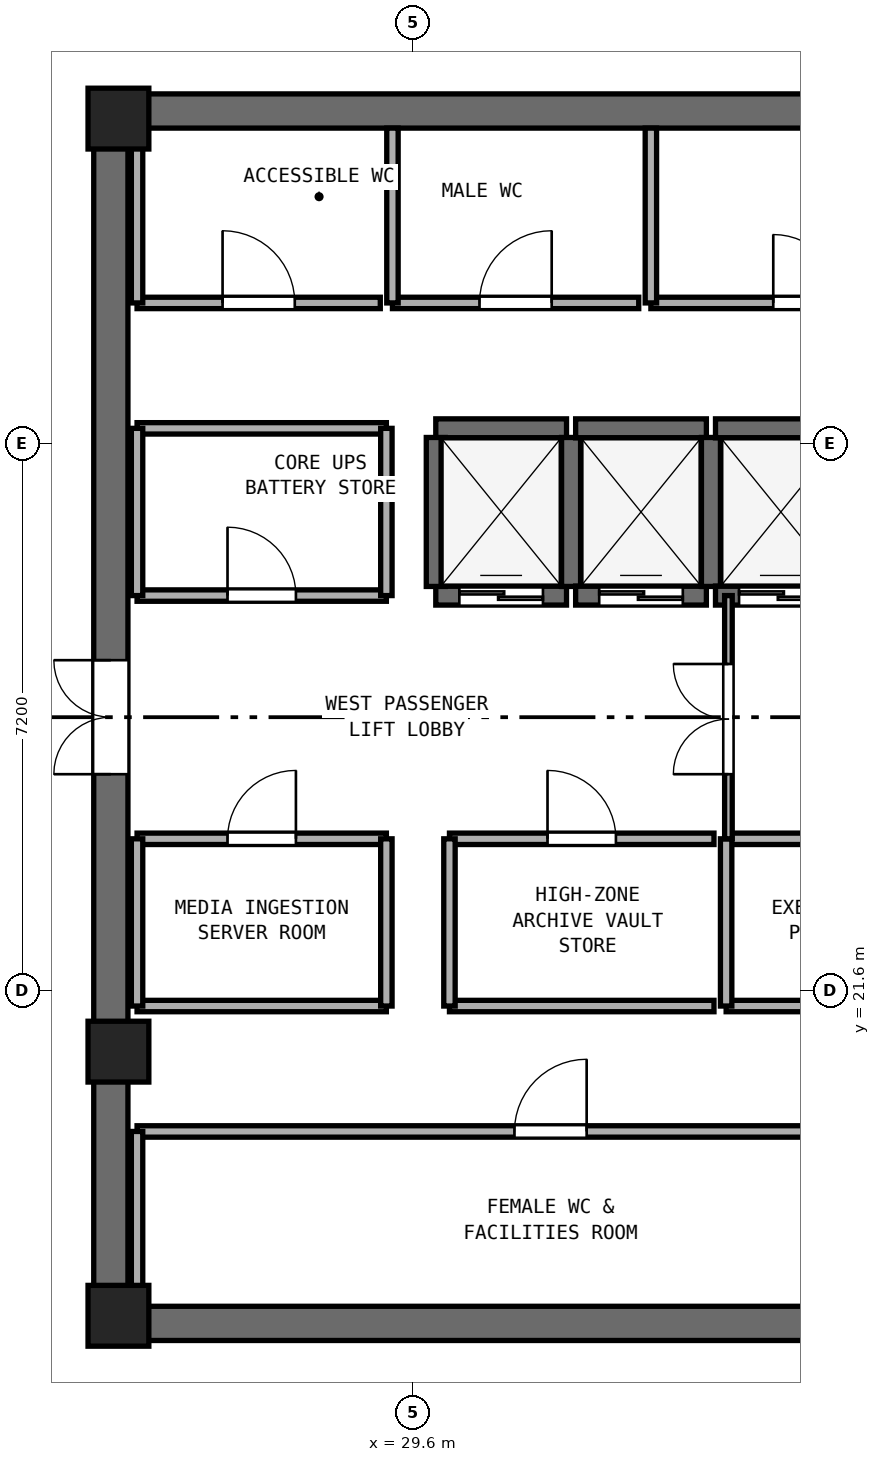
"""IFC4 building model, lengths in metres.
Left out: names, types, materials, properties, quantities, classifications, styles, units other than length and angle.
Written with IfcOpenShell. Run it as: python <this file> out.ifc"""

import sys

from ifc_helpers import new_model, si_unit, direction, frame, frame_2d, origin, origin_2d, place, context, subcontext, project, spatial, rectangle, extrude, element, fill, save


model = new_model("IFC4")
c1 = context("Model", 3, precision=1e-05, world=origin(), true_north=direction((0.0, 1.0)))
c2 = subcontext(c1, "Body", "Model", "MODEL_VIEW")
j1 = project(units=[si_unit("LENGTHUNIT", "METRE"), si_unit("PLANEANGLEUNIT", "RADIAN")], contexts=[c1])
p1 = place(None, origin())
s1 = spatial("IfcSite", under=j1, at=p1, CompositionType="ELEMENT")
p2 = place(p1, origin())
s2 = spatial("IfcBuilding", under=s1, at=p2, CompositionType="ELEMENT")
p3 = place(p2, frame((0.0, 0.0, 232.6)))
s3 = spatial("IfcBuildingStorey", under=s2, at=p3, CompositionType="ELEMENT", Elevation=232.6)
for number, where, z_axis, x_axis in (
    (1, (25.4, 17.225, 0.0), (0.0, 0.0, 1.0), (1.0, 0.0, 0.0)),
    (2, (25.4, 33.175, 0.0), (0.0, 0.0, 1.0), (1.0, 0.0, 0.0)),
):
    element("IfcWall", number, at=place(p3, frame(where, z_axis=z_axis, x_axis=x_axis)), inside=s3, PredefinedType="SHEAR", context=c2, shape_type="SweptSolid", body=[
        extrude(rectangle(XDim=23.2, YDim=0.45, at=frame_2d((11.6, 0.0))), origin(), (0.0, 0.0, 1.0), 3.51),
    ])
p4 = place(p3, frame((25.625, 17.45, 0.0), z_axis=(0.0, 0.0, 1.0), x_axis=(0.0, 1.0, 0.0)))
e3 = element("IfcWall", 3, at=p4, inside=s3, PredefinedType="SHEAR", context=c2, shape_type="SweptSolid", body=[
    extrude(rectangle(XDim=15.5, YDim=0.45, at=frame_2d((7.75, 0.0))), origin(), (0.0, 0.0, 1.0), 3.51),
])
p5 = place(p4, frame((7.0, 0.0, 0.0)))
e4 = element("IfcOpeningElement", 4, at=p5, cuts=e3, PredefinedType="OPENING", context=c2, shape_type="SweptSolid", body=[
    extrude(rectangle(XDim=1.5, YDim=2.15, at=frame_2d((0.75, 1.075))), frame((0.0, 0.235, 0.0), z_axis=(0.0, -1.0, 0.0), x_axis=(1.0, 0.0, 0.0)), (0.0, 0.0, 1.0), 0.47),
])
for number, where, z_axis, x_axis in (
    (5, (25.725, 17.325, 0.0), (0.0, 0.0, 1.0), (1.0, 0.0, 0.0)),
    (6, (25.725, 33.075, 0.0), (0.0, 0.0, 1.0), (1.0, 0.0, 0.0)),
    (7, (25.725, 20.8, 0.0), (0.0, 0.0, 1.0), (1.0, 0.0, 0.0)),
):
    element("IfcColumn", number, at=place(p3, frame(where, z_axis=z_axis, x_axis=x_axis)), inside=s3, PredefinedType="PILASTER", context=c2, shape_type="SweptSolid", body=[
        extrude(rectangle(XDim=0.8, YDim=0.8, at=origin_2d()), origin(), (0.0, 0.0, 1.0), 3.8),
    ])
p6 = place(p3, frame((29.9, 26.8, 0.0), z_axis=(0.0, 0.0, 1.0), x_axis=(1.0, 0.0, 0.0)))
e8 = element("IfcWall", 8, at=p6, inside=s3, PredefinedType="SHEAR", context=c2, shape_type="SweptSolid", body=[
    extrude(rectangle(XDim=1.72, YDim=0.25, at=frame_2d((0.86, 0.0))), origin(), (0.0, 0.0, 1.0), 3.51),
])
p7 = place(p6, frame((0.31, 0.0, 0.0)))
e9 = element("IfcOpeningElement", 9, at=p7, cuts=e8, PredefinedType="OPENING", context=c2, shape_type="SweptSolid", body=[
    extrude(rectangle(XDim=1.1, YDim=2.15, at=frame_2d((0.55, 1.075))), frame((0.0, 0.135, 0.0), z_axis=(0.0, -1.0, 0.0), x_axis=(1.0, 0.0, 0.0)), (0.0, 0.0, 1.0), 0.27),
])
p8 = place(p3, frame((29.9, 29.0, 0.0), z_axis=(0.0, 0.0, 1.0), x_axis=(1.0, 0.0, 0.0)))
e10 = element("IfcWall", 10, at=p8, inside=s3, PredefinedType="SHEAR", context=c2, shape_type="SweptSolid", body=[
    extrude(rectangle(XDim=1.72, YDim=0.25, at=frame_2d((0.86, 0.0))), origin(), (0.0, 0.0, 1.0), 3.51),
])
for number, where, z_axis, x_axis in (
    (11, (29.9, 26.92, 0.0), (0.0, 0.0, 1.0), (0.0, 1.0, 0.0)),
    (12, (31.68, 26.92, 0.0), (0.0, 0.0, 1.0), (0.0, 1.0, 0.0)),
):
    element("IfcWall", number, at=place(p3, frame(where, z_axis=z_axis, x_axis=x_axis)), inside=s3, PredefinedType="SHEAR", context=c2, shape_type="SweptSolid", body=[
        extrude(rectangle(XDim=1.96, YDim=0.25, at=frame_2d((0.98, 0.0))), origin(), (0.0, 0.0, 1.0), 3.51),
    ])
p9 = place(p3, frame((31.74, 26.8, 0.0), z_axis=(0.0, 0.0, 1.0), x_axis=(1.0, 0.0, 0.0)))
e13 = element("IfcWall", 13, at=p9, inside=s3, PredefinedType="SHEAR", context=c2, shape_type="SweptSolid", body=[
    extrude(rectangle(XDim=1.72, YDim=0.25, at=frame_2d((0.86, 0.0))), origin(), (0.0, 0.0, 1.0), 3.51),
])
p10 = place(p9, frame((0.31, 0.0, 0.0)))
e14 = element("IfcOpeningElement", 14, at=p10, cuts=e13, PredefinedType="OPENING", context=c2, shape_type="SweptSolid", body=[
    extrude(rectangle(XDim=1.1, YDim=2.15, at=frame_2d((0.55, 1.075))), frame((0.0, 0.135, 0.0), z_axis=(0.0, -1.0, 0.0), x_axis=(1.0, 0.0, 0.0)), (0.0, 0.0, 1.0), 0.27),
])
p11 = place(p3, frame((31.74, 29.0, 0.0), z_axis=(0.0, 0.0, 1.0), x_axis=(1.0, 0.0, 0.0)))
e15 = element("IfcWall", 15, at=p11, inside=s3, PredefinedType="SHEAR", context=c2, shape_type="SweptSolid", body=[
    extrude(rectangle(XDim=1.72, YDim=0.25, at=frame_2d((0.86, 0.0))), origin(), (0.0, 0.0, 1.0), 3.51),
])
p12 = place(p3, frame((33.52, 26.92, 0.0), z_axis=(0.0, 0.0, 1.0), x_axis=(0.0, 1.0, 0.0)))
e16 = element("IfcWall", 16, at=p12, inside=s3, PredefinedType="SHEAR", context=c2, shape_type="SweptSolid", body=[
    extrude(rectangle(XDim=1.96, YDim=0.25, at=frame_2d((0.98, 0.0))), origin(), (0.0, 0.0, 1.0), 3.51),
])
p13 = place(p3, frame((33.58, 26.8, 0.0), z_axis=(0.0, 0.0, 1.0), x_axis=(1.0, 0.0, 0.0)))
e17 = element("IfcWall", 17, at=p13, inside=s3, PredefinedType="SHEAR", context=c2, shape_type="SweptSolid", body=[
    extrude(rectangle(XDim=1.72, YDim=0.25, at=frame_2d((0.86, 0.0))), origin(), (0.0, 0.0, 1.0), 3.51),
])
p14 = place(p13, frame((0.31, 0.0, 0.0)))
e18 = element("IfcOpeningElement", 18, at=p14, cuts=e17, PredefinedType="OPENING", context=c2, shape_type="SweptSolid", body=[
    extrude(rectangle(XDim=1.1, YDim=2.15, at=frame_2d((0.55, 1.075))), frame((0.0, 0.135, 0.0), z_axis=(0.0, -1.0, 0.0), x_axis=(1.0, 0.0, 0.0)), (0.0, 0.0, 1.0), 0.27),
])
p15 = place(p3, frame((33.58, 29.0, 0.0), z_axis=(0.0, 0.0, 1.0), x_axis=(1.0, 0.0, 0.0)))
e19 = element("IfcWall", 19, at=p15, inside=s3, PredefinedType="SHEAR", context=c2, shape_type="SweptSolid", body=[
    extrude(rectangle(XDim=1.72, YDim=0.25, at=frame_2d((0.86, 0.0))), origin(), (0.0, 0.0, 1.0), 3.51),
])
p16 = place(p3, frame((25.97, 30.65, 0.0), z_axis=(0.0, 0.0, 1.0), x_axis=(1.0, 0.0, 0.0)))
e20 = element("IfcWall", 20, at=p16, inside=s3, PredefinedType="PARTITIONING", context=c2, shape_type="SweptSolid", body=[
    extrude(rectangle(XDim=3.2, YDim=0.15, at=frame_2d((1.6, 0.0))), origin(), (0.0, 0.0, 1.0), 3.51),
])
p17 = place(p16, frame((1.125, 0.0, 0.0)))
e21 = element("IfcOpeningElement", 21, at=p17, cuts=e20, PredefinedType="OPENING", context=c2, shape_type="SweptSolid", body=[
    extrude(rectangle(XDim=0.95, YDim=2.1, at=frame_2d((0.475, 1.05))), frame((0.0, 0.085, 0.0), z_axis=(0.0, -1.0, 0.0), x_axis=(1.0, 0.0, 0.0)), (0.0, 0.0, 1.0), 0.17),
])
p18 = place(p3, frame((25.97, 30.65, 0.0), z_axis=(0.0, 0.0, 1.0), x_axis=(0.0, 1.0, 0.0)))
e22 = element("IfcWall", 22, at=p18, inside=s3, PredefinedType="PARTITIONING", context=c2, shape_type="SweptSolid", body=[
    extrude(rectangle(XDim=2.3, YDim=0.15, at=frame_2d((1.15, 0.0))), origin(), (0.0, 0.0, 1.0), 2.61),
])
p19 = place(p3, frame((29.33, 30.65, 0.0), z_axis=(0.0, 0.0, 1.0), x_axis=(1.0, 0.0, 0.0)))
e23 = element("IfcWall", 23, at=p19, inside=s3, PredefinedType="PARTITIONING", context=c2, shape_type="SweptSolid", body=[
    extrude(rectangle(XDim=3.24, YDim=0.15, at=frame_2d((1.62, 0.0))), origin(), (0.0, 0.0, 1.0), 3.51),
])
p20 = place(p19, frame((1.145, 0.0, 0.0)))
e24 = element("IfcOpeningElement", 24, at=p20, cuts=e23, PredefinedType="OPENING", context=c2, shape_type="SweptSolid", body=[
    extrude(rectangle(XDim=0.95, YDim=2.1, at=frame_2d((0.475, 1.05))), frame((0.0, 0.085, 0.0), z_axis=(0.0, -1.0, 0.0), x_axis=(1.0, 0.0, 0.0)), (0.0, 0.0, 1.0), 0.17),
])
p21 = place(p3, frame((29.33, 30.65, 0.0), z_axis=(0.0, 0.0, 1.0), x_axis=(0.0, 1.0, 0.0)))
e25 = element("IfcWall", 25, at=p21, inside=s3, PredefinedType="PARTITIONING", context=c2, shape_type="SweptSolid", body=[
    extrude(rectangle(XDim=2.3, YDim=0.15, at=frame_2d((1.15, 0.0))), origin(), (0.0, 0.0, 1.0), 3.51),
])
p22 = place(p3, frame((32.73, 30.65, 0.0), z_axis=(0.0, 0.0, 1.0), x_axis=(1.0, 0.0, 0.0)))
e26 = element("IfcWall", 26, at=p22, inside=s3, PredefinedType="PARTITIONING", context=c2, shape_type="SweptSolid", body=[
    extrude(rectangle(XDim=4.12, YDim=0.15, at=frame_2d((2.06, 0.0))), origin(), (0.0, 0.0, 1.0), 3.51),
])
p23 = place(p22, frame((1.61, 0.0, 0.0)))
e27 = element("IfcOpeningElement", 27, at=p23, cuts=e26, PredefinedType="OPENING", context=c2, shape_type="SweptSolid", body=[
    extrude(rectangle(XDim=0.9, YDim=2.1, at=frame_2d((0.45, 1.05))), frame((0.0, 0.085, 0.0), z_axis=(0.0, -1.0, 0.0), x_axis=(1.0, 0.0, 0.0)), (0.0, 0.0, 1.0), 0.17),
])
p24 = place(p3, frame((32.73, 30.65, 0.0), z_axis=(0.0, 0.0, 1.0), x_axis=(0.0, 1.0, 0.0)))
e28 = element("IfcWall", 28, at=p24, inside=s3, PredefinedType="PARTITIONING", context=c2, shape_type="SweptSolid", body=[
    extrude(rectangle(XDim=2.3, YDim=0.15, at=frame_2d((1.15, 0.0))), origin(), (0.0, 0.0, 1.0), 3.51),
])
p25 = place(p3, frame((25.97, 19.75, 0.0), z_axis=(0.0, 0.0, 1.0), x_axis=(1.0, 0.0, 0.0)))
e29 = element("IfcWall", 29, at=p25, inside=s3, PredefinedType="PARTITIONING", context=c2, shape_type="SweptSolid", body=[
    extrude(rectangle(XDim=10.88, YDim=0.15, at=frame_2d((5.44, 0.0))), origin(), (0.0, 0.0, 1.0), 3.51),
])
p26 = place(p25, frame((4.965, 0.0, 0.0)))
e30 = element("IfcOpeningElement", 30, at=p26, cuts=e29, PredefinedType="OPENING", context=c2, shape_type="SweptSolid", body=[
    extrude(rectangle(XDim=0.95, YDim=2.1, at=frame_2d((0.475, 1.05))), frame((0.0, 0.085, 0.0), z_axis=(0.0, -1.0, 0.0), x_axis=(1.0, 0.0, 0.0)), (0.0, 0.0, 1.0), 0.17),
])
p27 = place(p3, frame((25.97, 17.45, 0.0), z_axis=(0.0, 0.0, 1.0), x_axis=(0.0, 1.0, 0.0)))
e31 = element("IfcWall", 31, at=p27, inside=s3, PredefinedType="PARTITIONING", context=c2, shape_type="SweptSolid", body=[
    extrude(rectangle(XDim=2.3, YDim=0.15, at=frame_2d((1.15, 0.0))), origin(), (0.0, 0.0, 1.0), 2.61),
])
p28 = place(p3, frame((25.97, 26.8, 0.0), z_axis=(0.0, 0.0, 1.0), x_axis=(1.0, 0.0, 0.0)))
e32 = element("IfcWall", 32, at=p28, inside=s3, PredefinedType="PARTITIONING", context=c2, shape_type="SweptSolid", body=[
    extrude(rectangle(XDim=3.28, YDim=0.15, at=frame_2d((1.64, 0.0))), origin(), (0.0, 0.0, 1.0), 3.51),
])
p29 = place(p28, frame((1.19, 0.0, 0.0)))
e33 = element("IfcOpeningElement", 33, at=p29, cuts=e32, PredefinedType="OPENING", context=c2, shape_type="SweptSolid", body=[
    extrude(rectangle(XDim=0.9, YDim=2.1, at=frame_2d((0.45, 1.05))), frame((0.0, 0.085, 0.0), z_axis=(0.0, -1.0, 0.0), x_axis=(1.0, 0.0, 0.0)), (0.0, 0.0, 1.0), 0.17),
])
p30 = place(p3, frame((25.97, 29.0, 0.0), z_axis=(0.0, 0.0, 1.0), x_axis=(1.0, 0.0, 0.0)))
e34 = element("IfcWall", 34, at=p30, inside=s3, PredefinedType="PARTITIONING", context=c2, shape_type="SweptSolid", body=[
    extrude(rectangle(XDim=3.28, YDim=0.15, at=frame_2d((1.64, 0.0))), origin(), (0.0, 0.0, 1.0), 3.51),
])
p31 = place(p3, frame((25.97, 26.8, 0.0), z_axis=(0.0, 0.0, 1.0), x_axis=(0.0, 1.0, 0.0)))
e35 = element("IfcWall", 35, at=p31, inside=s3, PredefinedType="PARTITIONING", context=c2, shape_type="SweptSolid", body=[
    extrude(rectangle(XDim=2.2, YDim=0.15, at=frame_2d((1.1, 0.0))), origin(), (0.0, 0.0, 1.0), 2.61),
])
p32 = place(p3, frame((29.25, 26.8, 0.0), z_axis=(0.0, 0.0, 1.0), x_axis=(0.0, 1.0, 0.0)))
e36 = element("IfcWall", 36, at=p32, inside=s3, PredefinedType="PARTITIONING", context=c2, shape_type="SweptSolid", body=[
    extrude(rectangle(XDim=2.2, YDim=0.15, at=frame_2d((1.1, 0.0))), origin(), (0.0, 0.0, 1.0), 3.51),
])
p33 = place(p3, frame((25.97, 21.4, 0.0), z_axis=(0.0, 0.0, 1.0), x_axis=(1.0, 0.0, 0.0)))
e37 = element("IfcWall", 37, at=p33, inside=s3, PredefinedType="PARTITIONING", context=c2, shape_type="SweptSolid", body=[
    extrude(rectangle(XDim=3.28, YDim=0.15, at=frame_2d((1.64, 0.0))), origin(), (0.0, 0.0, 1.0), 3.51),
])
p34 = place(p3, frame((25.97, 23.6, 0.0), z_axis=(0.0, 0.0, 1.0), x_axis=(1.0, 0.0, 0.0)))
e38 = element("IfcWall", 38, at=p34, inside=s3, PredefinedType="PARTITIONING", context=c2, shape_type="SweptSolid", body=[
    extrude(rectangle(XDim=3.28, YDim=0.15, at=frame_2d((1.64, 0.0))), origin(), (0.0, 0.0, 1.0), 3.51),
])
p35 = place(p34, frame((1.19, 0.0, 0.0)))
e39 = element("IfcOpeningElement", 39, at=p35, cuts=e38, PredefinedType="OPENING", context=c2, shape_type="SweptSolid", body=[
    extrude(rectangle(XDim=0.9, YDim=2.1, at=frame_2d((0.45, 1.05))), frame((0.0, 0.085, 0.0), z_axis=(0.0, -1.0, 0.0), x_axis=(1.0, 0.0, 0.0)), (0.0, 0.0, 1.0), 0.17),
])
p36 = place(p3, frame((25.97, 21.4, 0.0), z_axis=(0.0, 0.0, 1.0), x_axis=(0.0, 1.0, 0.0)))
e40 = element("IfcWall", 40, at=p36, inside=s3, PredefinedType="PARTITIONING", context=c2, shape_type="SweptSolid", body=[
    extrude(rectangle(XDim=2.2, YDim=0.15, at=frame_2d((1.1, 0.0))), origin(), (0.0, 0.0, 1.0), 2.61),
])
p37 = place(p3, frame((29.25, 21.4, 0.0), z_axis=(0.0, 0.0, 1.0), x_axis=(0.0, 1.0, 0.0)))
e41 = element("IfcWall", 41, at=p37, inside=s3, PredefinedType="PARTITIONING", context=c2, shape_type="SweptSolid", body=[
    extrude(rectangle(XDim=2.2, YDim=0.15, at=frame_2d((1.1, 0.0))), origin(), (0.0, 0.0, 1.0), 3.51),
])
p38 = place(p3, frame((30.08, 21.4, 0.0), z_axis=(0.0, 0.0, 1.0), x_axis=(1.0, 0.0, 0.0)))
e42 = element("IfcWall", 42, at=p38, inside=s3, PredefinedType="PARTITIONING", context=c2, shape_type="SweptSolid", body=[
    extrude(rectangle(XDim=3.48, YDim=0.15, at=frame_2d((1.74, 0.0))), origin(), (0.0, 0.0, 1.0), 3.51),
])
p39 = place(p3, frame((30.08, 23.6, 0.0), z_axis=(0.0, 0.0, 1.0), x_axis=(1.0, 0.0, 0.0)))
e43 = element("IfcWall", 43, at=p39, inside=s3, PredefinedType="PARTITIONING", context=c2, shape_type="SweptSolid", body=[
    extrude(rectangle(XDim=3.48, YDim=0.15, at=frame_2d((1.74, 0.0))), origin(), (0.0, 0.0, 1.0), 3.51),
])
p40 = place(p39, frame((1.29, 0.0, 0.0)))
e44 = element("IfcOpeningElement", 44, at=p40, cuts=e43, PredefinedType="OPENING", context=c2, shape_type="SweptSolid", body=[
    extrude(rectangle(XDim=0.9, YDim=2.1, at=frame_2d((0.45, 1.05))), frame((0.0, 0.085, 0.0), z_axis=(0.0, -1.0, 0.0), x_axis=(1.0, 0.0, 0.0)), (0.0, 0.0, 1.0), 0.17),
])
p41 = place(p3, frame((30.08, 21.4, 0.0), z_axis=(0.0, 0.0, 1.0), x_axis=(0.0, 1.0, 0.0)))
e45 = element("IfcWall", 45, at=p41, inside=s3, PredefinedType="PARTITIONING", context=c2, shape_type="SweptSolid", body=[
    extrude(rectangle(XDim=2.2, YDim=0.15, at=frame_2d((1.1, 0.0))), origin(), (0.0, 0.0, 1.0), 3.51),
])
p42 = place(p3, frame((33.72, 21.4, 0.0), z_axis=(0.0, 0.0, 1.0), x_axis=(1.0, 0.0, 0.0)))
e46 = element("IfcWall", 46, at=p42, inside=s3, PredefinedType="PARTITIONING", context=c2, shape_type="SweptSolid", body=[
    extrude(rectangle(XDim=3.48, YDim=0.15, at=frame_2d((1.74, 0.0))), origin(), (0.0, 0.0, 1.0), 3.51),
])
p43 = place(p3, frame((33.72, 23.6, 0.0), z_axis=(0.0, 0.0, 1.0), x_axis=(1.0, 0.0, 0.0)))
e47 = element("IfcWall", 47, at=p43, inside=s3, PredefinedType="PARTITIONING", context=c2, shape_type="SweptSolid", body=[
    extrude(rectangle(XDim=3.48, YDim=0.15, at=frame_2d((1.74, 0.0))), origin(), (0.0, 0.0, 1.0), 3.51),
])
p44 = place(p43, frame((1.29, 0.0, 0.0)))
e48 = element("IfcOpeningElement", 48, at=p44, cuts=e47, PredefinedType="OPENING", context=c2, shape_type="SweptSolid", body=[
    extrude(rectangle(XDim=0.9, YDim=2.1, at=frame_2d((0.45, 1.05))), frame((0.0, 0.085, 0.0), z_axis=(0.0, -1.0, 0.0), x_axis=(1.0, 0.0, 0.0)), (0.0, 0.0, 1.0), 0.17),
])
p45 = place(p3, frame((33.72, 21.4, 0.0), z_axis=(0.0, 0.0, 1.0), x_axis=(0.0, 1.0, 0.0)))
e49 = element("IfcWall", 49, at=p45, inside=s3, PredefinedType="PARTITIONING", context=c2, shape_type="SweptSolid", body=[
    extrude(rectangle(XDim=2.2, YDim=0.15, at=frame_2d((1.1, 0.0))), origin(), (0.0, 0.0, 1.0), 3.51),
])
p46 = place(p3, frame((33.75, 23.6, 0.0), z_axis=(0.0, 0.0, 1.0), x_axis=(0.0, 1.0, 0.0)))
e50 = element("IfcWall", 50, at=p46, inside=s3, PredefinedType="PARTITIONING", context=c2, shape_type="SweptSolid", body=[
    extrude(rectangle(XDim=3.2, YDim=0.1, at=frame_2d((1.6, 0.0))), origin(), (0.0, 0.0, 1.0), 3.51),
])
p47 = place(p46, frame((0.85, 0.0, 0.0)))
e51 = element("IfcOpeningElement", 51, at=p47, cuts=e50, PredefinedType="OPENING", context=c2, shape_type="SweptSolid", body=[
    extrude(rectangle(XDim=1.45, YDim=2.12, at=frame_2d((0.725, 1.06))), frame((0.0, 0.06, 0.0), z_axis=(0.0, -1.0, 0.0), x_axis=(1.0, 0.0, 0.0)), (0.0, 0.0, 1.0), 0.12),
])
p48 = place(p7, origin())
e52 = element("IfcDoor", 52, at=p48, inside=s3, OperationType="DOUBLE_DOOR_SLIDING", PredefinedType="DOOR", context=c2, shape_type="SweptSolid", body=[
    extrude(rectangle(XDim=1.1, YDim=2.15, at=frame_2d((0.55, 1.075))), frame((0.0, 0.025, 0.0), z_axis=(0.0, -1.0, 0.0), x_axis=(1.0, 0.0, 0.0)), (0.0, 0.0, 1.0), 0.05),
])
fill(e9, e52)
p49 = place(p10, origin())
e53 = element("IfcDoor", 53, at=p49, inside=s3, OperationType="DOUBLE_DOOR_SLIDING", PredefinedType="DOOR", context=c2, shape_type="SweptSolid", body=[
    extrude(rectangle(XDim=1.1, YDim=2.15, at=frame_2d((0.55, 1.075))), frame((0.0, 0.025, 0.0), z_axis=(0.0, -1.0, 0.0), x_axis=(1.0, 0.0, 0.0)), (0.0, 0.0, 1.0), 0.05),
])
fill(e14, e53)
p50 = place(p14, origin())
e54 = element("IfcDoor", 54, at=p50, inside=s3, OperationType="DOUBLE_DOOR_SLIDING", PredefinedType="DOOR", context=c2, shape_type="SweptSolid", body=[
    extrude(rectangle(XDim=1.1, YDim=2.15, at=frame_2d((0.55, 1.075))), frame((0.0, 0.025, 0.0), z_axis=(0.0, -1.0, 0.0), x_axis=(1.0, 0.0, 0.0)), (0.0, 0.0, 1.0), 0.05),
])
fill(e18, e54)
p51 = place(p5, origin())
e55 = element("IfcDoor", 55, at=p51, inside=s3, OperationType="DOUBLE_DOOR_SINGLE_SWING", PredefinedType="DOOR", context=c2, shape_type="SweptSolid", body=[
    extrude(rectangle(XDim=1.5, YDim=2.15, at=frame_2d((0.75, 1.075))), frame((0.0, 0.025, 0.0), z_axis=(0.0, -1.0, 0.0), x_axis=(1.0, 0.0, 0.0)), (0.0, 0.0, 1.0), 0.05),
])
fill(e4, e55)
p52 = place(p17, origin())
e56 = element("IfcDoor", 56, at=p52, inside=s3, OperationType="SINGLE_SWING_LEFT", PredefinedType="DOOR", context=c2, shape_type="SweptSolid", body=[
    extrude(rectangle(XDim=0.95, YDim=2.1, at=frame_2d((0.475, 1.05))), frame((0.0, 0.025, 0.0), z_axis=(0.0, -1.0, 0.0), x_axis=(1.0, 0.0, 0.0)), (0.0, 0.0, 1.0), 0.05),
])
fill(e21, e56)
p53 = place(p20, origin())
e57 = element("IfcDoor", 57, at=p53, inside=s3, OperationType="SINGLE_SWING_RIGHT", PredefinedType="DOOR", context=c2, shape_type="SweptSolid", body=[
    extrude(rectangle(XDim=0.95, YDim=2.1, at=frame_2d((0.475, 1.05))), frame((0.0, 0.025, 0.0), z_axis=(0.0, -1.0, 0.0), x_axis=(1.0, 0.0, 0.0)), (0.0, 0.0, 1.0), 0.05),
])
fill(e24, e57)
p54 = place(p23, origin())
e58 = element("IfcDoor", 58, at=p54, inside=s3, OperationType="SINGLE_SWING_LEFT", PredefinedType="DOOR", context=c2, shape_type="SweptSolid", body=[
    extrude(rectangle(XDim=0.9, YDim=2.1, at=frame_2d((0.45, 1.05))), frame((0.0, 0.025, 0.0), z_axis=(0.0, -1.0, 0.0), x_axis=(1.0, 0.0, 0.0)), (0.0, 0.0, 1.0), 0.05),
])
fill(e27, e58)
p55 = place(p26, origin())
e59 = element("IfcDoor", 59, at=p55, inside=s3, OperationType="SINGLE_SWING_RIGHT", PredefinedType="DOOR", context=c2, shape_type="SweptSolid", body=[
    extrude(rectangle(XDim=0.95, YDim=2.1, at=frame_2d((0.475, 1.05))), frame((0.0, 0.025, 0.0), z_axis=(0.0, -1.0, 0.0), x_axis=(1.0, 0.0, 0.0)), (0.0, 0.0, 1.0), 0.05),
])
fill(e30, e59)
p56 = place(p29, origin())
e60 = element("IfcDoor", 60, at=p56, inside=s3, OperationType="SINGLE_SWING_LEFT", PredefinedType="DOOR", context=c2, shape_type="SweptSolid", body=[
    extrude(rectangle(XDim=0.9, YDim=2.1, at=frame_2d((0.45, 1.05))), frame((0.0, 0.025, 0.0), z_axis=(0.0, -1.0, 0.0), x_axis=(1.0, 0.0, 0.0)), (0.0, 0.0, 1.0), 0.05),
])
fill(e33, e60)
p57 = place(p35, origin())
e61 = element("IfcDoor", 61, at=p57, inside=s3, OperationType="SINGLE_SWING_RIGHT", PredefinedType="DOOR", context=c2, shape_type="SweptSolid", body=[
    extrude(rectangle(XDim=0.9, YDim=2.1, at=frame_2d((0.45, 1.05))), frame((0.0, 0.025, 0.0), z_axis=(0.0, -1.0, 0.0), x_axis=(1.0, 0.0, 0.0)), (0.0, 0.0, 1.0), 0.05),
])
fill(e39, e61)
p58 = place(p40, origin())
e62 = element("IfcDoor", 62, at=p58, inside=s3, OperationType="SINGLE_SWING_LEFT", PredefinedType="DOOR", context=c2, shape_type="SweptSolid", body=[
    extrude(rectangle(XDim=0.9, YDim=2.1, at=frame_2d((0.45, 1.05))), frame((0.0, 0.025, 0.0), z_axis=(0.0, -1.0, 0.0), x_axis=(1.0, 0.0, 0.0)), (0.0, 0.0, 1.0), 0.05),
])
fill(e44, e62)
p59 = place(p47, origin())
e63 = element("IfcDoor", 63, at=p59, inside=s3, OperationType="DOUBLE_DOOR_SINGLE_SWING", PredefinedType="DOOR", context=c2, shape_type="SweptSolid", body=[
    extrude(rectangle(XDim=1.45, YDim=2.12, at=frame_2d((0.725, 1.06))), frame((0.0, 0.025, 0.0), z_axis=(0.0, -1.0, 0.0), x_axis=(1.0, 0.0, 0.0)), (0.0, 0.0, 1.0), 0.05),
])
fill(e51, e63)
save(model, sys.argv[1])
